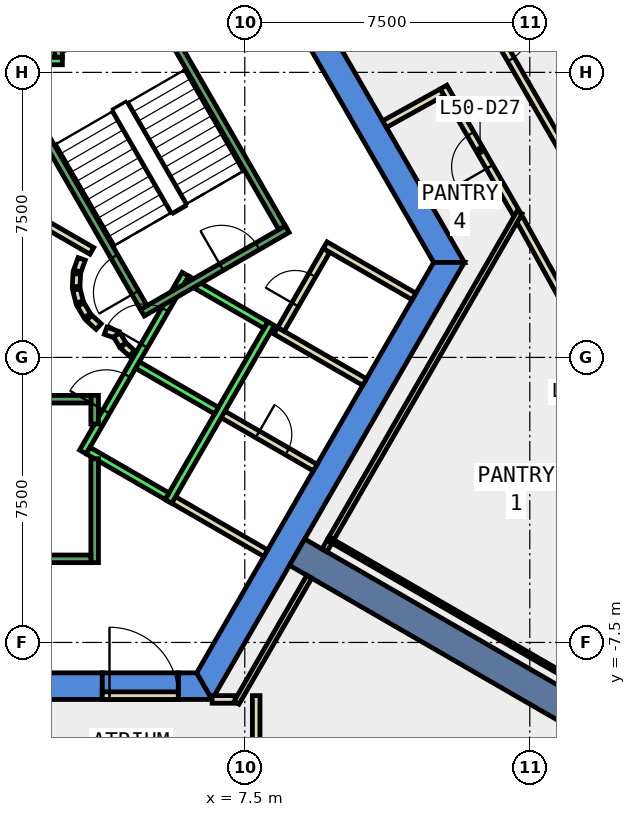
"""IFC4 building model, lengths in metres.
Left out: names, types, materials, properties, quantities, classifications, styles, units other than length and angle.
Written with IfcOpenShell. Run it as: python <this file> out.ifc"""

import sys

from ifc_helpers import new_model, si_unit, direction, frame, frame_2d, origin, place, context, subcontext, project, spatial, polyline, rectangle, outline, extrude, element, fill, save


model = new_model("IFC4")
c1 = context("Model", 3, precision=1e-05, world=origin(), true_north=direction((0.0, 1.0)))
c2 = subcontext(c1, "Body", "Model", "MODEL_VIEW")
j1 = project(units=[si_unit("LENGTHUNIT", "METRE"), si_unit("PLANEANGLEUNIT", "RADIAN")], contexts=[c1])
p1 = place(None, origin())
s1 = spatial("IfcSite", under=j1, at=p1, CompositionType="ELEMENT")
p2 = place(p1, origin())
s2 = spatial("IfcBuilding", under=s1, at=p2, CompositionType="ELEMENT")
p3 = place(p2, frame((0.0, 0.0, 223.4)))
s3 = spatial("IfcBuildingStorey", under=s2, at=p3, CompositionType="ELEMENT", Elevation=223.4)
p4 = place(p3, frame((0.0, 0.0, -0.4)))
e1 = element("IfcWall", 1, at=p4, inside=s3, PredefinedType="SHEAR", context=c2, shape_type="SweptSolid", body=[
    extrude(outline(polyline([(8.084, 11.498), (7.478, 11.148), (12.471, 2.5), (13.279, 2.5), (8.084, 11.498)])), origin(), (0.0, 0.0, 1.0), 4.2),
])
p5 = place(p3, frame((0.0, 0.0, -0.4)))
e2 = element("IfcWall", 2, at=p5, inside=s3, PredefinedType="SHEAR", context=c2, shape_type="SweptSolid", body=[
    extrude(outline(polyline([(3.75, -9.0), (3.75, -8.3), (-6.235, -8.3), (-6.64, -9.0), (3.75, -9.0)])), origin(), (0.0, 0.0, 1.0), 4.2),
])
p6 = place(p3, frame((0.0, 0.0, -0.4)))
e3 = element("IfcWall", 3, at=p6, inside=s3, PredefinedType="SHEAR", context=c2, shape_type="SweptSolid", body=[
    extrude(outline(polyline([(5.75, -8.3), (5.75, -9.0), (6.64, -9.0), (6.235, -8.3), (5.75, -8.3)])), origin(), (0.0, 0.0, 1.0), 4.2),
])
p7 = place(p3, frame((0.0, 0.0, 3.6)))
e4 = element("IfcWall", 4, at=p7, inside=s3, PredefinedType="SHEAR", context=c2, shape_type="SweptSolid", body=[
    extrude(outline(polyline([(5.75, -9.0), (5.75, -8.3), (3.75, -8.3), (3.75, -9.0), (5.75, -9.0)])), origin(), (0.0, 0.0, 1.0), 0.2),
])
p8 = place(p3, frame((0.0, 0.0, -0.4)))
e5 = element("IfcWall", 5, at=p8, inside=s3, PredefinedType="SHEAR", context=c2, shape_type="SweptSolid", body=[
    extrude(outline(polyline([(6.64, -9.0), (13.279, 2.5), (12.471, 2.5), (6.235, -8.3), (6.64, -9.0)])), origin(), (0.0, 0.0, 1.0), 4.2),
])
p9 = place(p3, frame((8.877, -5.125, -0.4), z_axis=(0.0, 0.0, 1.0), x_axis=(0.866017533419, -0.500013631625, 0.0)))
e6 = element("IfcWall", 6, at=p9, inside=s3, PredefinedType="SHEAR", context=c2, shape_type="SweptSolid", body=[
    extrude(rectangle(XDim=9.0, YDim=0.8, at=frame_2d((4.5, 0.0))), origin(), (0.0, 0.0, 1.0), 4.2),
])
p10 = place(p3, frame((14.652, 3.783, 0.0), z_axis=(0.0, 0.0, 1.0), x_axis=(-0.499821427992, 0.866128477837, 0.0)))
e7 = element("IfcWall", 7, at=p10, inside=s3, PredefinedType="PARTITIONING", context=c2, shape_type="SweptSolid", body=[
    extrude(rectangle(XDim=3.844, YDim=0.2, at=frame_2d((1.922, 0.0))), origin(), (0.0, 0.0, 1.0), 3.8),
])
p11 = place(p10, frame((1.421, 0.0, 0.0)))
e8 = element("IfcOpeningElement", 8, at=p11, cuts=e7, PredefinedType="OPENING", context=c2, shape_type="SweptSolid", body=[
    extrude(rectangle(XDim=1.0, YDim=2.1, at=frame_2d((0.5, 1.05))), frame((0.0, 0.11, 0.0), z_axis=(0.0, -1.0, 0.0), x_axis=(1.0, 0.0, 0.0)), (0.0, 0.0, 1.0), 0.22),
])
p12 = place(p3, frame((12.693, 6.976, 0.0), z_axis=(0.0, 0.0, 1.0), x_axis=(-0.874908151187, -0.484288887944, 0.0)))
e9 = element("IfcWall", 9, at=p12, inside=s3, PredefinedType="PARTITIONING", context=c2, shape_type="SweptSolid", body=[
    extrude(rectangle(XDim=1.731, YDim=0.2, at=frame_2d((0.865, 0.0))), origin(), (0.0, 0.0, 1.0), 3.8),
])
p13 = place(p3, frame((18.574, -3.303, 0.0), z_axis=(0.0, 0.0, 1.0), x_axis=(-0.484239190765, 0.874935658279, 0.0)))
e10 = element("IfcWall", 10, at=p13, inside=s3, PredefinedType="PARTITIONING", context=c2, shape_type="SweptSolid", body=[
    extrude(rectangle(XDim=7.963, YDim=0.2, at=frame_2d((3.981, 0.0))), origin(), (0.0, 0.0, 1.0), 3.8),
])
p14 = place(p13, frame((3.482, 0.0, 0.0)))
e11 = element("IfcOpeningElement", 11, at=p14, cuts=e10, PredefinedType="OPENING", context=c2, shape_type="SweptSolid", body=[
    extrude(rectangle(XDim=1.0, YDim=2.1, at=frame_2d((0.5, 1.05))), frame((0.0, 0.11, 0.0), z_axis=(0.0, -1.0, 0.0), x_axis=(1.0, 0.0, 0.0)), (0.0, 0.0, 1.0), 0.22),
])
p15 = place(p3, frame((12.202, 11.828, 0.0), z_axis=(0.0, 0.0, 1.0), x_axis=(0.499919823193, -0.866071688937, 0.0)))
e12 = element("IfcWall", 12, at=p15, inside=s3, PredefinedType="PARTITIONING", context=c2, shape_type="SweptSolid", body=[
    extrude(rectangle(XDim=8.209, YDim=0.2, at=frame_2d((4.104, 0.0))), origin(), (0.0, 0.0, 1.0), 3.8),
])
p16 = place(p15, frame((3.604, 0.0, 0.0)))
e13 = element("IfcOpeningElement", 13, at=p16, cuts=e12, PredefinedType="OPENING", context=c2, shape_type="SweptSolid", body=[
    extrude(rectangle(XDim=1.0, YDim=2.1, at=frame_2d((0.5, 1.05))), frame((0.0, 0.11, 0.0), z_axis=(0.0, -1.0, 0.0), x_axis=(1.0, 0.0, 0.0)), (0.0, 0.0, 1.0), 0.22),
])
p17 = place(p3, frame((8.053, -5.152, 0.0), z_axis=(0.0, 0.0, 1.0), x_axis=(-0.865808344015, 0.500375770231, 0.0)))
e14 = element("IfcWall", 14, at=p17, inside=s3, PredefinedType="PARTITIONING", context=c2, shape_type="SweptSolid", body=[
    extrude(rectangle(XDim=2.9, YDim=0.2, at=frame_2d((1.45, 0.0))), origin(), (0.0, 0.0, 1.0), 3.8),
])
p18 = place(p3, frame((6.841, -1.451, 0.0), z_axis=(0.0, 0.0, 1.0), x_axis=(0.866220623736, -0.499661716578, 0.0)))
e15 = element("IfcWall", 15, at=p18, inside=s3, PredefinedType="PARTITIONING", context=c2, shape_type="SweptSolid", body=[
    extrude(rectangle(XDim=2.9, YDim=0.2, at=frame_2d((1.45, 0.0))), origin(), (0.0, 0.0, 1.0), 3.8),
])
p19 = place(p18, frame((1.15, 0.0, 0.0)))
e16 = element("IfcOpeningElement", 16, at=p19, cuts=e15, PredefinedType="OPENING", context=c2, shape_type="SweptSolid", body=[
    extrude(rectangle(XDim=0.9, YDim=2.1, at=frame_2d((0.45, 1.05))), frame((0.0, 0.11, 0.0), z_axis=(0.0, -1.0, 0.0), x_axis=(1.0, 0.0, 0.0)), (0.0, 0.0, 1.0), 0.22),
])
p20 = place(p3, frame((10.653, -0.648, 0.0), z_axis=(0.0, 0.0, 1.0), x_axis=(-0.866036505625, 0.499980770555, 0.0)))
e17 = element("IfcWall", 17, at=p20, inside=s3, PredefinedType="PARTITIONING", context=c2, shape_type="SweptSolid", body=[
    extrude(rectangle(XDim=2.7, YDim=0.2, at=frame_2d((1.35, 0.0))), origin(), (0.0, 0.0, 1.0), 3.8),
])
p21 = place(p3, frame((8.451, 0.738, 0.0), z_axis=(0.0, 0.0, 1.0), x_axis=(0.499913221443, 0.866075499611, 0.0)))
e18 = element("IfcWall", 18, at=p21, inside=s3, PredefinedType="PARTITIONING", context=c2, shape_type="SweptSolid", body=[
    extrude(rectangle(XDim=2.4, YDim=0.2, at=frame_2d((1.2, 0.0))), origin(), (0.0, 0.0, 1.0), 3.8),
])
p22 = place(p21, frame((0.75, 0.0, 0.0)))
e19 = element("IfcOpeningElement", 19, at=p22, cuts=e18, PredefinedType="OPENING", context=c2, shape_type="SweptSolid", body=[
    extrude(rectangle(XDim=0.9, YDim=2.1, at=frame_2d((0.45, 1.05))), frame((0.0, 0.11, 0.0), z_axis=(0.0, -1.0, 0.0), x_axis=(1.0, 0.0, 0.0)), (0.0, 0.0, 1.0), 0.22),
])
p23 = place(p3, frame((9.615, 2.953, 0.0), z_axis=(0.0, 0.0, 1.0), x_axis=(0.866013897511, -0.50001992892, 0.0)))
e20 = element("IfcWall", 20, at=p23, inside=s3, PredefinedType="PARTITIONING", context=c2, shape_type="SweptSolid", body=[
    extrude(rectangle(XDim=2.7, YDim=0.2, at=frame_2d((1.35, 0.0))), origin(), (0.0, 0.0, 1.0), 3.8),
])
p24 = place(p3, frame((6.641, -8.999, 0.0), z_axis=(0.0, 0.0, 1.0), x_axis=(1.0, 0.0, 0.0)))
e21 = element("IfcWall", 21, at=p24, inside=s3, PredefinedType="PARTITIONING", context=c2, shape_type="SweptSolid", body=[
    extrude(rectangle(XDim=0.617, YDim=0.2, at=frame_2d((0.309, 0.0))), origin(), (0.0, 0.0, 1.0), 3.8),
])
p25 = place(p3, frame((7.283, -9.086, 0.0), z_axis=(0.0, 0.0, 1.0), x_axis=(0.500035303972, 0.866005020067, 0.0)))
e22 = element("IfcWall", 22, at=p25, inside=s3, PredefinedType="PARTITIONING", context=c2, shape_type="SweptSolid", body=[
    extrude(rectangle(XDim=3.828, YDim=0.15, at=frame_2d((1.914, 0.0))), origin(), (0.0, 0.0, 1.0), 3.8),
])
p26 = place(p3, frame((9.779, -4.762, 0.0), z_axis=(0.0, 0.0, 1.0), x_axis=(0.499990552429, 0.866030858274, 0.0)))
e23 = element("IfcWall", 23, at=p26, inside=s3, PredefinedType="PARTITIONING", context=c2, shape_type="SweptSolid", body=[
    extrude(rectangle(XDim=9.906, YDim=0.15, at=frame_2d((4.953, 0.0))), origin(), (0.0, 0.0, 1.0), 3.8),
])
p27 = place(p3, frame((1.866, 3.732, 0.0), z_axis=(0.0, 0.0, 1.0), x_axis=(0.866043361281, -0.499968895414, 0.0)))
e24 = element("IfcWall", 24, at=p27, inside=s3, PredefinedType="PARTITIONING", context=c2, shape_type="SweptSolid", body=[
    extrude(rectangle(XDim=1.858, YDim=0.2, at=frame_2d((0.929, 0.0))), origin(), (0.0, 0.0, 1.0), 3.8),
])
p28 = place(p3, frame((3.208, 2.592, 0.0), z_axis=(0.0, 0.0, 1.0), x_axis=(-0.337388820924, -0.941365382578, 0.0)))
e25 = element("IfcWall", 25, at=p28, inside=s3, PredefinedType="PARTITIONING", context=c2, shape_type="SweptSolid", body=[
    extrude(rectangle(XDim=0.338, YDim=0.2, at=frame_2d((0.169, 0.0))), origin(), (0.0, 0.0, 1.0), 3.8),
])
p29 = place(p3, frame((3.079, 2.199, 0.0), z_axis=(0.0, 0.0, 1.0), x_axis=(-0.047771483479, -0.998858290933, 0.0)))
e26 = element("IfcWall", 26, at=p29, inside=s3, PredefinedType="PARTITIONING", context=c2, shape_type="SweptSolid", body=[
    extrude(rectangle(XDim=0.337, YDim=0.2, at=frame_2d((0.169, 0.0))), origin(), (0.0, 0.0, 1.0), 3.8),
])
p30 = place(p3, frame((3.07, 1.786, 0.0), z_axis=(0.0, 0.0, 1.0), x_axis=(0.242705583207, -0.970099994784, 0.0)))
e27 = element("IfcWall", 27, at=p30, inside=s3, PredefinedType="PARTITIONING", context=c2, shape_type="SweptSolid", body=[
    extrude(rectangle(XDim=0.338, YDim=0.2, at=frame_2d((0.169, 0.0))), origin(), (0.0, 0.0, 1.0), 3.8),
])
for number, where, z_axis, x_axis in (
    (28, (3.182, 1.388, 0.0), (0.0, 0.0, 1.0), (0.512, -0.859, 0.0)),
    (29, (3.404, 1.039, 0.0), (0.0, 0.0, 1.0), (0.74, -0.672, 0.0)),
):
    element("IfcWall", number, at=place(p3, frame(where, z_axis=z_axis, x_axis=x_axis)), inside=s3, PredefinedType="PARTITIONING", context=c2, shape_type="SweptSolid", body=[
        extrude(rectangle(XDim=0.338, YDim=0.2, at=frame_2d((0.169, 0.0))), origin(), (0.0, 0.0, 1.0), 3.8),
    ])
p31 = place(p3, frame((3.838, 0.702, 0.0), z_axis=(0.0, 0.0, 1.0), x_axis=(0.941035081519, -0.338308993895, 0.0)))
e30 = element("IfcWall", 30, at=p31, inside=s3, PredefinedType="PARTITIONING", context=c2, shape_type="SweptSolid", body=[
    extrude(rectangle(XDim=0.337, YDim=0.2, at=frame_2d((0.168, 0.0))), origin(), (0.0, 0.0, 1.0), 3.8),
])
p32 = place(p3, frame((4.132, 0.593, 0.0), z_axis=(0.0, 0.0, 1.0), x_axis=(0.513561617048, -0.858052717201, 0.0)))
e31 = element("IfcWall", 31, at=p32, inside=s3, PredefinedType="PARTITIONING", context=c2, shape_type="SweptSolid", body=[
    extrude(rectangle(XDim=0.308, YDim=0.2, at=frame_2d((0.154, 0.0))), origin(), (0.0, 0.0, 1.0), 3.8),
])
p33 = place(p3, frame((4.301, 0.315, 0.0), z_axis=(0.0, 0.0, 1.0), x_axis=(0.741798017506, -0.670623367639, 0.0)))
e32 = element("IfcWall", 32, at=p33, inside=s3, PredefinedType="PARTITIONING", context=c2, shape_type="SweptSolid", body=[
    extrude(rectangle(XDim=0.309, YDim=0.2, at=frame_2d((0.154, 0.0))), origin(), (0.0, 0.0, 1.0), 3.8),
])
p34 = place(p3, frame((7.8, -8.899, 0.0), z_axis=(0.0, 0.0, 1.0), x_axis=(0.0, -1.0, 0.0)))
e33 = element("IfcWall", 33, at=p34, inside=s3, PredefinedType="PARTITIONING", context=c2, shape_type="SweptSolid", body=[
    extrude(rectangle(XDim=6.06, YDim=0.2, at=frame_2d((3.03, 0.0))), origin(), (0.0, 0.0, 1.0), 3.8),
])
p35 = place(p3, frame((9.689, -4.768, 0.0), z_axis=(0.0, 0.0, 1.0), x_axis=(0.866023322577, -0.500003604739, 0.0)))
e34 = element("IfcWall", 34, at=p35, inside=s3, PredefinedType="PARTITIONING", context=c2, shape_type="SweptSolid", body=[
    extrude(rectangle(XDim=11.15, YDim=0.1, at=frame_2d((5.575, 0.0))), origin(), (0.0, 0.0, 1.0), 3.8),
])
p36 = place(p3, frame((3.75, -8.9, 0.0), z_axis=(0.0, 0.0, 1.0), x_axis=(1.0, 0.0, 0.0)))
e35 = element("IfcWall", 35, at=p36, inside=s3, PredefinedType="PARTITIONING", context=c2, shape_type="SweptSolid", body=[
    extrude(rectangle(XDim=2.0, YDim=0.2, at=frame_2d((1.0, 0.0))), origin(), (0.0, 0.0, 1.0), 2.4),
])
p37 = place(p36, frame((0.19, 0.0, 0.0)))
e36 = element("IfcOpeningElement", 36, at=p37, cuts=e35, PredefinedType="OPENING", context=c2, shape_type="SweptSolid", body=[
    extrude(rectangle(XDim=1.8, YDim=2.1, at=frame_2d((0.9, 1.05))), frame((0.0, 0.11, 0.0), z_axis=(0.0, -1.0, 0.0), x_axis=(1.0, 0.0, 0.0)), (0.0, 0.0, 1.0), 0.22),
])
p38 = place(p3, frame((9.596, -5.079, 0.0), z_axis=(0.0, 0.0, 1.0), x_axis=(0.500782702656, 0.865573038351, 0.0)))
e37 = element("IfcWall", 37, at=p38, inside=s3, PredefinedType="PARTITIONING", context=c2, shape_type="SweptSolid", body=[
    extrude(rectangle(XDim=0.266, YDim=0.15, at=frame_2d((0.133, 0.0))), origin(), (0.0, 0.0, 1.0), 3.8),
])
p39 = place(p3, frame((2.7, 7.8, 0.0), z_axis=(0.0, 0.0, 1.0), x_axis=(-1.0, 0.0, 0.0)))
e38 = element("IfcWall", 38, at=p39, inside=s3, PredefinedType="STANDARD", context=c2, shape_type="SweptSolid", body=[
    extrude(rectangle(XDim=5.4, YDim=0.2, at=frame_2d((2.7, 0.0))), origin(), (0.0, 0.0, 1.0), 3.8),
])
p40 = place(p39, frame((1.225, 0.0, 0.0)))
e39 = element("IfcOpeningElement", 39, at=p40, cuts=e38, PredefinedType="OPENING", context=c2, shape_type="SweptSolid", body=[
    extrude(rectangle(XDim=1.1, YDim=2.1, at=frame_2d((0.55, 1.05))), frame((0.0, 0.11, 0.0), z_axis=(0.0, -1.0, 0.0), x_axis=(1.0, 0.0, 0.0)), (0.0, 0.0, 1.0), 0.22),
])
p41 = place(p39, frame((3.075, 0.0, 0.0)))
e40 = element("IfcOpeningElement", 40, at=p41, cuts=e38, PredefinedType="OPENING", context=c2, shape_type="SweptSolid", body=[
    extrude(rectangle(XDim=1.1, YDim=2.1, at=frame_2d((0.55, 1.05))), frame((0.0, 0.11, 0.0), z_axis=(0.0, -1.0, 0.0), x_axis=(1.0, 0.0, 0.0)), (0.0, 0.0, 1.0), 0.22),
])
p42 = place(p3, frame((2.6, 7.9, 0.0), z_axis=(0.0, 0.0, 1.0), x_axis=(0.0, 1.0, 0.0)))
e41 = element("IfcWall", 41, at=p42, inside=s3, PredefinedType="STANDARD", context=c2, shape_type="SweptSolid", body=[
    extrude(rectangle(XDim=2.4, YDim=0.2, at=frame_2d((1.2, 0.0))), origin(), (0.0, 0.0, 1.0), 3.8),
])
p43 = place(p3, frame((3.24, -2.488, 0.0), z_axis=(0.0, 0.0, 1.0), x_axis=(0.500034260056, 0.866005622828, 0.0)))
e42 = element("IfcWall", 42, at=p43, inside=s3, PredefinedType="STANDARD", context=c2, shape_type="SweptSolid", body=[
    extrude(rectangle(XDim=5.399, YDim=0.2, at=frame_2d((2.7, 0.0))), origin(), (0.0, 0.0, 1.0), 3.8),
])
p44 = place(p43, frame((3.225, 0.0, 0.0)))
e43 = element("IfcOpeningElement", 43, at=p44, cuts=e42, PredefinedType="OPENING", context=c2, shape_type="SweptSolid", body=[
    extrude(rectangle(XDim=1.1, YDim=2.1, at=frame_2d((0.55, 1.05))), frame((0.0, 0.11, 0.0), z_axis=(0.0, -1.0, 0.0), x_axis=(1.0, 0.0, 0.0)), (0.0, 0.0, 1.0), 0.22),
])
p45 = place(p43, frame((1.225, 0.0, 0.0)))
e44 = element("IfcOpeningElement", 44, at=p45, cuts=e42, PredefinedType="OPENING", context=c2, shape_type="SweptSolid", body=[
    extrude(rectangle(XDim=1.1, YDim=2.1, at=frame_2d((0.55, 1.05))), frame((0.0, 0.11, 0.0), z_axis=(0.0, -1.0, 0.0), x_axis=(1.0, 0.0, 0.0)), (0.0, 0.0, 1.0), 0.22),
])
p46 = place(p3, frame((5.492, -3.788, 0.0), z_axis=(0.0, 0.0, 1.0), x_axis=(0.500034260056, 0.866005622828, 0.0)))
e45 = element("IfcWall", 45, at=p46, inside=s3, PredefinedType="STANDARD", context=c2, shape_type="SweptSolid", body=[
    extrude(rectangle(XDim=5.399, YDim=0.2, at=frame_2d((2.7, 0.0))), origin(), (0.0, 0.0, 1.0), 3.8),
])
p47 = place(p3, frame((3.377, -2.452, 0.0), z_axis=(0.0, 0.0, 1.0), x_axis=(0.865955154139, -0.50012165622, 0.0)))
e46 = element("IfcWall", 46, at=p47, inside=s3, PredefinedType="STANDARD", context=c2, shape_type="SweptSolid", body=[
    extrude(rectangle(XDim=2.4, YDim=0.2, at=frame_2d((1.2, 0.0))), origin(), (0.0, 0.0, 1.0), 3.8),
])
for number, where, z_axis, x_axis in (
    (47, (4.677, -0.2, 0.0), (0.0, 0.0, 1.0), (0.866, -0.5, 0.0)),
    (48, (5.977, 2.052, 0.0), (0.0, 0.0, 1.0), (0.866, -0.5, 0.0)),
):
    element("IfcWall", number, at=place(p3, frame(where, z_axis=z_axis, x_axis=x_axis)), inside=s3, PredefinedType="STANDARD", context=c2, shape_type="SweptSolid", body=[
        extrude(rectangle(XDim=2.399, YDim=0.2, at=frame_2d((1.2, 0.0))), origin(), (0.0, 0.0, 1.0), 3.8),
    ])
p48 = place(p3, frame((3.55, -2.667, 0.0), z_axis=(0.0, 0.0, 1.0), x_axis=(0.0, -1.0, 0.0)))
e49 = element("IfcWall", 49, at=p48, inside=s3, PredefinedType="STANDARD", context=c2, shape_type="SweptSolid", body=[
    extrude(rectangle(XDim=2.733, YDim=0.2, at=frame_2d((1.366, 0.0))), origin(), (0.0, 0.0, 1.0), 3.8),
])
p49 = place(p3, frame((3.55, -1.0, 0.0), z_axis=(0.0, 0.0, 1.0), x_axis=(0.0, -1.0, 0.0)))
e50 = element("IfcWall", 50, at=p49, inside=s3, PredefinedType="STANDARD", context=c2, shape_type="SweptSolid", body=[
    extrude(rectangle(XDim=0.751, YDim=0.2, at=frame_2d((0.375, 0.0))), origin(), (0.0, 0.0, 1.0), 3.8),
])
p50 = place(p3, frame((-3.45, -1.1, 0.0), z_axis=(0.0, 0.0, 1.0), x_axis=(1.0, 0.0, 0.0)))
e51 = element("IfcWall", 51, at=p50, inside=s3, PredefinedType="STANDARD", context=c2, shape_type="SweptSolid", body=[
    extrude(rectangle(XDim=6.9, YDim=0.2, at=frame_2d((3.45, 0.0))), origin(), (0.0, 0.0, 1.0), 3.8),
])
p51 = place(p50, frame((0.45, 0.0, 0.0)))
e52 = element("IfcOpeningElement", 52, at=p51, cuts=e51, PredefinedType="OPENING", context=c2, shape_type="SweptSolid", body=[
    extrude(rectangle(XDim=1.1, YDim=2.2, at=frame_2d((0.55, 1.1))), frame((0.0, 0.11, 0.0), z_axis=(0.0, -1.0, 0.0), x_axis=(1.0, 0.0, 0.0)), (0.0, 0.0, 1.0), 0.22),
])
p52 = place(p3, frame((-3.45, -5.3, 0.0), z_axis=(0.0, 0.0, 1.0), x_axis=(1.0, 0.0, 0.0)))
e53 = element("IfcWall", 53, at=p52, inside=s3, PredefinedType="STANDARD", context=c2, shape_type="SweptSolid", body=[
    extrude(rectangle(XDim=6.9, YDim=0.2, at=frame_2d((3.45, 0.0))), origin(), (0.0, 0.0, 1.0), 3.8),
])
p53 = place(p3, frame((4.806, 1.176, 0.0), z_axis=(0.0, 0.0, 1.0), x_axis=(0.866059941101, 0.499940174841, 0.0)))
e54 = element("IfcWall", 54, at=p53, inside=s3, PredefinedType="STANDARD", context=c2, shape_type="SweptSolid", body=[
    extrude(rectangle(XDim=4.4, YDim=0.2, at=frame_2d((2.2, 0.0))), origin(), (0.0, 0.0, 1.0), 3.8),
])
p54 = place(p53, frame((2.4, 0.0, 0.0)))
e55 = element("IfcOpeningElement", 55, at=p54, cuts=e54, PredefinedType="OPENING", context=c2, shape_type="SweptSolid", body=[
    extrude(rectangle(XDim=1.1, YDim=2.2, at=frame_2d((0.55, 1.1))), frame((0.0, 0.11, 0.0), z_axis=(0.0, -1.0, 0.0), x_axis=(1.0, 0.0, 0.0)), (0.0, 0.0, 1.0), 0.22),
])
p55 = place(p3, frame((4.843, 1.312, 0.0), z_axis=(0.0, 0.0, 1.0), x_axis=(-0.499963383562, 0.866046543262, 0.0)))
e56 = element("IfcWall", 56, at=p55, inside=s3, PredefinedType="STANDARD", context=c2, shape_type="SweptSolid", body=[
    extrude(rectangle(XDim=6.9, YDim=0.2, at=frame_2d((3.45, 0.0))), origin(), (0.0, 0.0, 1.0), 3.8),
])
p56 = place(p55, frame((0.45, 0.0, 0.0)))
e57 = element("IfcOpeningElement", 57, at=p56, cuts=e56, PredefinedType="OPENING", context=c2, shape_type="SweptSolid", body=[
    extrude(rectangle(XDim=1.1, YDim=2.2, at=frame_2d((0.55, 1.1))), frame((0.0, 0.11, 0.0), z_axis=(0.0, -1.0, 0.0), x_axis=(1.0, 0.0, 0.0)), (0.0, 0.0, 1.0), 0.22),
])
p57 = place(p3, frame((8.48, 3.412, 0.0), z_axis=(0.0, 0.0, 1.0), x_axis=(-0.499978703459, 0.866037698999, 0.0)))
e58 = element("IfcWall", 58, at=p57, inside=s3, PredefinedType="STANDARD", context=c2, shape_type="SweptSolid", body=[
    extrude(rectangle(XDim=6.9, YDim=0.2, at=frame_2d((3.45, 0.0))), origin(), (0.0, 0.0, 1.0), 3.8),
])
p58 = place(p16, origin())
e59 = element("IfcDoor", 59, at=p58, inside=s3, OperationType="SINGLE_SWING_RIGHT", PredefinedType="DOOR", context=c2, shape_type="SweptSolid", body=[
    extrude(rectangle(XDim=1.0, YDim=2.1, at=frame_2d((0.5, 1.05))), frame((0.0, 0.025, 0.0), z_axis=(0.0, -1.0, 0.0), x_axis=(1.0, 0.0, 0.0)), (0.0, 0.0, 1.0), 0.05),
])
fill(e13, e59)
p59 = place(p11, origin())
e60 = element("IfcDoor", 60, at=p59, inside=s3, OperationType="SINGLE_SWING_LEFT", PredefinedType="DOOR", context=c2, shape_type="SweptSolid", body=[
    extrude(rectangle(XDim=1.0, YDim=2.1, at=frame_2d((0.5, 1.05))), frame((0.0, 0.025, 0.0), z_axis=(0.0, -1.0, 0.0), x_axis=(1.0, 0.0, 0.0)), (0.0, 0.0, 1.0), 0.05),
])
fill(e8, e60)
p60 = place(p19, origin())
e61 = element("IfcDoor", 61, at=p60, inside=s3, OperationType="SINGLE_SWING_LEFT", PredefinedType="DOOR", context=c2, shape_type="SweptSolid", body=[
    extrude(rectangle(XDim=0.9, YDim=2.1, at=frame_2d((0.45, 1.05))), frame((0.0, 0.025, 0.0), z_axis=(0.0, -1.0, 0.0), x_axis=(1.0, 0.0, 0.0)), (0.0, 0.0, 1.0), 0.05),
])
fill(e16, e61)
p61 = place(p22, origin())
e62 = element("IfcDoor", 62, at=p61, inside=s3, OperationType="SINGLE_SWING_LEFT", PredefinedType="DOOR", context=c2, shape_type="SweptSolid", body=[
    extrude(rectangle(XDim=0.9, YDim=2.1, at=frame_2d((0.45, 1.05))), frame((0.0, 0.025, 0.0), z_axis=(0.0, -1.0, 0.0), x_axis=(1.0, 0.0, 0.0)), (0.0, 0.0, 1.0), 0.05),
])
fill(e19, e62)
p62 = place(p37, origin())
e63 = element("IfcDoor", 63, at=p62, inside=s3, OperationType="DOUBLE_DOOR_SINGLE_SWING", PredefinedType="DOOR", context=c2, shape_type="SweptSolid", body=[
    extrude(rectangle(XDim=1.8, YDim=2.1, at=frame_2d((0.9, 1.05))), frame((0.0, 0.025, 0.0), z_axis=(0.0, -1.0, 0.0), x_axis=(1.0, 0.0, 0.0)), (0.0, 0.0, 1.0), 0.05),
])
fill(e36, e63)
p63 = place(p44, origin())
e64 = element("IfcDoor", 64, at=p63, inside=s3, OperationType="SLIDING_TO_LEFT", PredefinedType="DOOR", context=c2, shape_type="SweptSolid", body=[
    extrude(rectangle(XDim=1.1, YDim=2.1, at=frame_2d((0.55, 1.05))), frame((0.0, 0.025, 0.0), z_axis=(0.0, -1.0, 0.0), x_axis=(1.0, 0.0, 0.0)), (0.0, 0.0, 1.0), 0.05),
])
fill(e43, e64)
p64 = place(p45, origin())
e65 = element("IfcDoor", 65, at=p64, inside=s3, OperationType="SLIDING_TO_LEFT", PredefinedType="DOOR", context=c2, shape_type="SweptSolid", body=[
    extrude(rectangle(XDim=1.1, YDim=2.1, at=frame_2d((0.55, 1.05))), frame((0.0, 0.025, 0.0), z_axis=(0.0, -1.0, 0.0), x_axis=(1.0, 0.0, 0.0)), (0.0, 0.0, 1.0), 0.05),
])
fill(e44, e65)
p65 = place(p56, origin())
e66 = element("IfcDoor", 66, at=p65, inside=s3, OperationType="SINGLE_SWING_LEFT", PredefinedType="DOOR", context=c2, shape_type="SweptSolid", body=[
    extrude(rectangle(XDim=1.1, YDim=2.2, at=frame_2d((0.55, 1.1))), frame((0.0, 0.025, 0.0), z_axis=(0.0, -1.0, 0.0), x_axis=(1.0, 0.0, 0.0)), (0.0, 0.0, 1.0), 0.05),
])
fill(e57, e66)
p66 = place(p54, origin())
e67 = element("IfcDoor", 67, at=p66, inside=s3, OperationType="SINGLE_SWING_LEFT", PredefinedType="DOOR", context=c2, shape_type="SweptSolid", body=[
    extrude(rectangle(XDim=1.1, YDim=2.2, at=frame_2d((0.55, 1.1))), frame((0.0, 0.025, 0.0), z_axis=(0.0, -1.0, 0.0), x_axis=(1.0, 0.0, 0.0)), (0.0, 0.0, 1.0), 0.05),
])
fill(e55, e67)
save(model, sys.argv[1])
